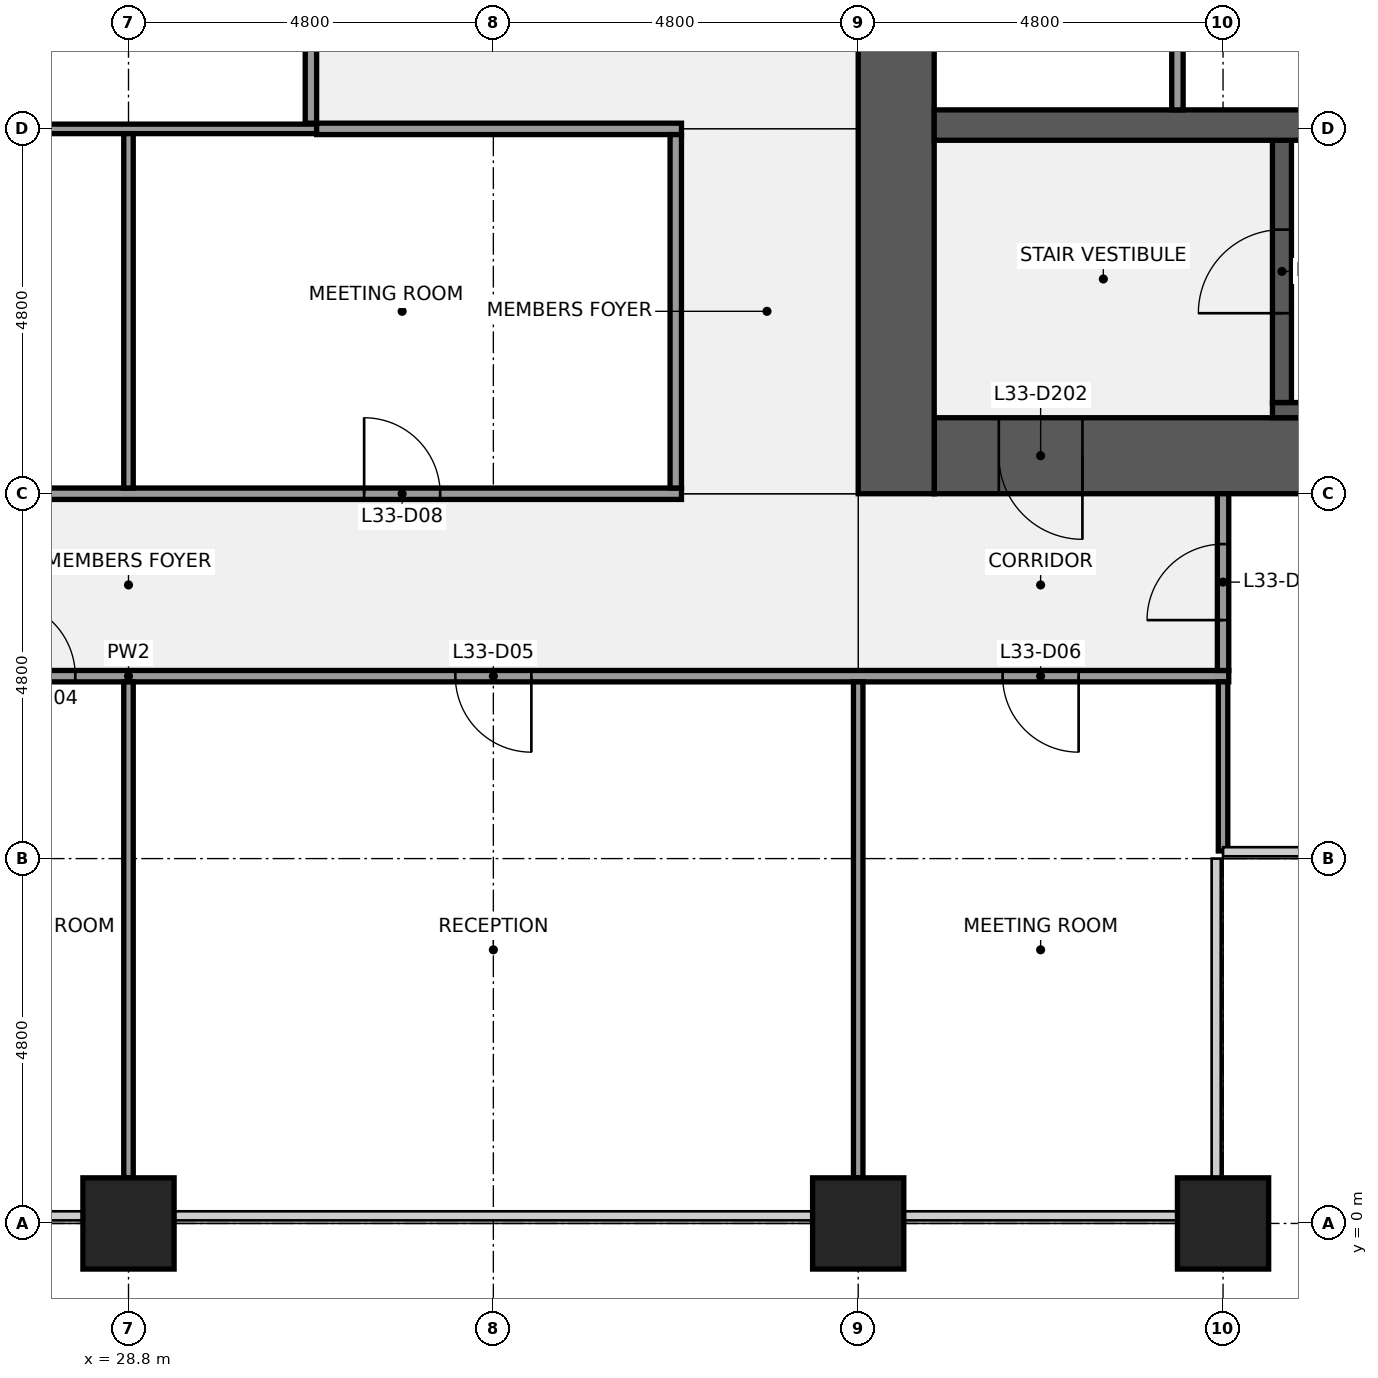
"""IFC4 building model, lengths in metres.
Left out: names, types, materials, properties, quantities, classifications, styles, units other than length and angle.
Written with IfcOpenShell. Run it as: python <this file> out.ifc"""

import sys

from ifc_helpers import new_model, si_unit, direction, frame, frame_2d, origin, origin_2d, place, context, subcontext, project, spatial, rectangle, extrude, element, fill, save


model = new_model("IFC4")
c1 = context("Model", 3, precision=1e-05, world=origin(), true_north=direction((0.0, 1.0)))
c2 = subcontext(c1, "Body", "Model", "MODEL_VIEW")
j1 = project(units=[si_unit("LENGTHUNIT", "METRE"), si_unit("PLANEANGLEUNIT", "RADIAN")], contexts=[c1])
p1 = place(None, origin())
s1 = spatial("IfcSite", under=j1, at=p1, CompositionType="ELEMENT")
p2 = place(p1, origin())
s2 = spatial("IfcBuilding", under=s1, at=p2, CompositionType="ELEMENT")
p3 = place(p2, frame((0.0, 0.0, 152.1)))
s3 = spatial("IfcBuildingStorey", under=s2, at=p3, CompositionType="ELEMENT", Elevation=152.1)
for number, where, z_axis, x_axis in (
    (1, (28.8, 0.0, 0.0), (0.0, 0.0, 1.0), (1.0, 0.0, 0.0)),
    (2, (38.4, 0.0, 0.0), (0.0, 0.0, 1.0), (1.0, 0.0, 0.0)),
    (3, (43.2, 0.0, 0.0), (0.0, 0.0, 1.0), (1.0, 0.0, 0.0)),
):
    element("IfcColumn", number, at=place(p3, frame(where, z_axis=z_axis, x_axis=x_axis)), inside=s3, PredefinedType="COLUMN", context=c2, shape_type="SweptSolid", body=[
        extrude(rectangle(XDim=1.2, YDim=1.2, at=origin_2d()), origin(), (0.0, 0.0, 1.0), 4.0),
    ])
p4 = place(p3, frame((48.0, 10.1, 0.0), z_axis=(0.0, 0.0, 1.0), x_axis=(-1.0, 0.0, 0.0)))
e4 = element("IfcWall", 4, at=p4, inside=s3, PredefinedType="SHEAR", context=c2, shape_type="SweptSolid", body=[
    extrude(rectangle(XDim=8.6, YDim=1.0, at=frame_2d((4.3, 0.0))), origin(), (0.0, 0.0, 1.0), 3.84),
])
p5 = place(p4, frame((6.65, 0.0, 0.0)))
e5 = element("IfcOpeningElement", 5, at=p5, cuts=e4, PredefinedType="OPENING", context=c2, shape_type="SweptSolid", body=[
    extrude(rectangle(XDim=1.1, YDim=2.1, at=frame_2d((0.55, 1.05))), frame((0.0, 0.51, 0.0), z_axis=(0.0, -1.0, 0.0), x_axis=(1.0, 0.0, 0.0)), (0.0, 0.0, 1.0), 1.02),
])
p6 = place(p3, frame((38.9, 9.6, 0.0), z_axis=(0.0, 0.0, 1.0), x_axis=(0.0, 1.0, 0.0)))
e6 = element("IfcWall", 6, at=p6, inside=s3, PredefinedType="SHEAR", context=c2, shape_type="SweptSolid", body=[
    extrude(rectangle(XDim=28.8, YDim=1.0, at=frame_2d((14.4, 0.0))), origin(), (0.0, 0.0, 1.0), 3.84),
])
p7 = place(p6, frame((8.7, 0.0, 0.0)))
e7 = element("IfcOpeningElement", 7, at=p7, cuts=e6, PredefinedType="OPENING", context=c2, shape_type="SweptSolid", body=[
    extrude(rectangle(XDim=1.8, YDim=2.1, at=frame_2d((0.9, 1.05))), frame((0.0, 0.51, 0.0), z_axis=(0.0, -1.0, 0.0), x_axis=(1.0, 0.0, 0.0)), (0.0, 0.0, 1.0), 1.02),
])
p8 = place(p6, frame((18.3, 0.0, 0.0)))
e8 = element("IfcOpeningElement", 8, at=p8, cuts=e6, PredefinedType="OPENING", context=c2, shape_type="SweptSolid", body=[
    extrude(rectangle(XDim=1.8, YDim=2.1, at=frame_2d((0.9, 1.05))), frame((0.0, 0.51, 0.0), z_axis=(0.0, -1.0, 0.0), x_axis=(1.0, 0.0, 0.0)), (0.0, 0.0, 1.0), 1.02),
])
p9 = place(p3, frame((43.85, 10.7, 0.0), z_axis=(0.0, 0.0, 1.0), x_axis=(1.0, 0.0, 0.0)))
e9 = element("IfcWall", 9, at=p9, inside=s3, PredefinedType="SHEAR", context=c2, shape_type="SweptSolid", body=[
    extrude(rectangle(XDim=4.15, YDim=0.2, at=frame_2d((2.075, 0.0))), origin(), (0.0, 0.0, 1.0), 3.84),
])
p10 = place(p3, frame((43.975, 10.8, 0.0), z_axis=(0.0, 0.0, 1.0), x_axis=(0.0, 1.0, 0.0)))
e10 = element("IfcWall", 10, at=p10, inside=s3, PredefinedType="SHEAR", context=c2, shape_type="SweptSolid", body=[
    extrude(rectangle(XDim=3.45, YDim=0.25, at=frame_2d((1.725, 0.0))), origin(), (0.0, 0.0, 1.0), 3.84),
])
p11 = place(p10, frame((1.175, 0.0, 0.0)))
e11 = element("IfcOpeningElement", 11, at=p11, cuts=e10, PredefinedType="OPENING", context=c2, shape_type="SweptSolid", body=[
    extrude(rectangle(XDim=1.1, YDim=2.1, at=frame_2d((0.55, 1.05))), frame((0.0, 0.135, 0.0), z_axis=(0.0, -1.0, 0.0), x_axis=(1.0, 0.0, 0.0)), (0.0, 0.0, 1.0), 0.27),
])
p12 = place(p3, frame((39.4, 14.45, 0.0), z_axis=(0.0, 0.0, 1.0), x_axis=(1.0, 0.0, 0.0)))
e12 = element("IfcWall", 12, at=p12, inside=s3, PredefinedType="SHEAR", context=c2, shape_type="SweptSolid", body=[
    extrude(rectangle(XDim=17.2, YDim=0.4, at=frame_2d((8.6, 0.0))), origin(), (0.0, 0.0, 1.0), 3.84),
])
p13 = place(p3, frame((42.6, 14.65, 0.0), z_axis=(0.0, 0.0, 1.0), x_axis=(0.0, 1.0, 0.0)))
e13 = element("IfcWall", 13, at=p13, inside=s3, PredefinedType="PARTITIONING", context=c2, shape_type="SweptSolid", body=[
    extrude(rectangle(XDim=2.6, YDim=0.15, at=frame_2d((1.3, 0.0))), origin(), (0.0, 0.0, 1.0), 3.84),
])
p14 = place(p3, frame((14.325, 7.2, 0.0), z_axis=(0.0, 0.0, 1.0), x_axis=(1.0, 0.0, 0.0)))
e14 = element("IfcWall", 14, at=p14, inside=s3, PredefinedType="PARTITIONING", context=c2, shape_type="SweptSolid", body=[
    extrude(rectangle(XDim=28.95, YDim=0.15, at=frame_2d((14.475, 0.0))), origin(), (0.0, 0.0, 1.0), 2.936),
])
p15 = place(p14, frame((1.975, 0.0, 0.0)))
e15 = element("IfcOpeningElement", 15, at=p15, cuts=e14, PredefinedType="OPENING", context=c2, shape_type="SweptSolid", body=[
    extrude(rectangle(XDim=1.0, YDim=2.1, at=frame_2d((0.5, 1.05))), frame((0.0, 0.085, 0.0), z_axis=(0.0, -1.0, 0.0), x_axis=(1.0, 0.0, 0.0)), (0.0, 0.0, 1.0), 0.17),
])
p16 = place(p14, frame((5.575, 0.0, 0.0)))
e16 = element("IfcOpeningElement", 16, at=p16, cuts=e14, PredefinedType="OPENING", context=c2, shape_type="SweptSolid", body=[
    extrude(rectangle(XDim=1.0, YDim=2.1, at=frame_2d((0.5, 1.05))), frame((0.0, 0.085, 0.0), z_axis=(0.0, -1.0, 0.0), x_axis=(1.0, 0.0, 0.0)), (0.0, 0.0, 1.0), 0.17),
])
p17 = place(p14, frame((9.175, 0.0, 0.0)))
e17 = element("IfcOpeningElement", 17, at=p17, cuts=e14, PredefinedType="OPENING", context=c2, shape_type="SweptSolid", body=[
    extrude(rectangle(XDim=1.0, YDim=2.1, at=frame_2d((0.5, 1.05))), frame((0.0, 0.085, 0.0), z_axis=(0.0, -1.0, 0.0), x_axis=(1.0, 0.0, 0.0)), (0.0, 0.0, 1.0), 0.17),
])
p18 = place(p14, frame((12.775, 0.0, 0.0)))
e18 = element("IfcOpeningElement", 18, at=p18, cuts=e14, PredefinedType="OPENING", context=c2, shape_type="SweptSolid", body=[
    extrude(rectangle(XDim=1.0, YDim=2.1, at=frame_2d((0.5, 1.05))), frame((0.0, 0.085, 0.0), z_axis=(0.0, -1.0, 0.0), x_axis=(1.0, 0.0, 0.0)), (0.0, 0.0, 1.0), 0.17),
])
p19 = place(p14, frame((18.775, 0.0, 0.0)))
e19 = element("IfcOpeningElement", 19, at=p19, cuts=e14, PredefinedType="OPENING", context=c2, shape_type="SweptSolid", body=[
    extrude(rectangle(XDim=1.0, YDim=2.1, at=frame_2d((0.5, 1.05))), frame((0.0, 0.085, 0.0), z_axis=(0.0, -1.0, 0.0), x_axis=(1.0, 0.0, 0.0)), (0.0, 0.0, 1.0), 0.17),
])
p20 = place(p14, frame((25.975, 0.0, 0.0)))
e20 = element("IfcOpeningElement", 20, at=p20, cuts=e14, PredefinedType="OPENING", context=c2, shape_type="SweptSolid", body=[
    extrude(rectangle(XDim=1.0, YDim=2.1, at=frame_2d((0.5, 1.05))), frame((0.0, 0.085, 0.0), z_axis=(0.0, -1.0, 0.0), x_axis=(1.0, 0.0, 0.0)), (0.0, 0.0, 1.0), 0.17),
])
p21 = place(p3, frame((21.525, 9.6, 0.0), z_axis=(0.0, 0.0, 1.0), x_axis=(1.0, 0.0, 0.0)))
e21 = element("IfcWall", 21, at=p21, inside=s3, PredefinedType="PARTITIONING", context=c2, shape_type="SweptSolid", body=[
    extrude(rectangle(XDim=14.55, YDim=0.15, at=frame_2d((7.275, 0.0))), origin(), (0.0, 0.0, 1.0), 2.936),
])
p22 = place(p21, frame((3.175, 0.0, 0.0)))
e22 = element("IfcOpeningElement", 22, at=p22, cuts=e21, PredefinedType="OPENING", context=c2, shape_type="SweptSolid", body=[
    extrude(rectangle(XDim=1.0, YDim=2.1, at=frame_2d((0.5, 1.05))), frame((0.0, 0.085, 0.0), z_axis=(0.0, -1.0, 0.0), x_axis=(1.0, 0.0, 0.0)), (0.0, 0.0, 1.0), 0.17),
])
p23 = place(p21, frame((10.375, 0.0, 0.0)))
e23 = element("IfcOpeningElement", 23, at=p23, cuts=e21, PredefinedType="OPENING", context=c2, shape_type="SweptSolid", body=[
    extrude(rectangle(XDim=1.0, YDim=2.1, at=frame_2d((0.5, 1.05))), frame((0.0, 0.085, 0.0), z_axis=(0.0, -1.0, 0.0), x_axis=(1.0, 0.0, 0.0)), (0.0, 0.0, 1.0), 0.17),
])
p24 = place(p3, frame((26.475, 14.4, 0.0), z_axis=(0.0, 0.0, 1.0), x_axis=(1.0, 0.0, 0.0)))
e24 = element("IfcWall", 24, at=p24, inside=s3, PredefinedType="PARTITIONING", context=c2, shape_type="SweptSolid", body=[
    extrude(rectangle(XDim=4.8, YDim=0.125, at=frame_2d((2.4, 0.0))), origin(), (0.0, 0.0, 1.0), 2.936),
])
p25 = place(p3, frame((31.275, 14.4, 0.0), z_axis=(0.0, 0.0, 1.0), x_axis=(1.0, 0.0, 0.0)))
e25 = element("IfcWall", 25, at=p25, inside=s3, PredefinedType="PARTITIONING", context=c2, shape_type="SweptSolid", body=[
    extrude(rectangle(XDim=4.8, YDim=0.15, at=frame_2d((2.4, 0.0))), origin(), (0.0, 0.0, 1.0), 2.936),
])
p26 = place(p3, frame((28.8, 0.6, 0.0), z_axis=(0.0, 0.0, 1.0), x_axis=(0.0, 1.0, 0.0)))
e26 = element("IfcWall", 26, at=p26, inside=s3, PredefinedType="PARTITIONING", context=c2, shape_type="SweptSolid", body=[
    extrude(rectangle(XDim=6.525, YDim=0.125, at=frame_2d((3.262, 0.0))), origin(), (0.0, 0.0, 1.0), 2.936),
])
p27 = place(p3, frame((28.8, 9.675, 0.0), z_axis=(0.0, 0.0, 1.0), x_axis=(0.0, 1.0, 0.0)))
e27 = element("IfcWall", 27, at=p27, inside=s3, PredefinedType="PARTITIONING", context=c2, shape_type="SweptSolid", body=[
    extrude(rectangle(XDim=4.662, YDim=0.125, at=frame_2d((2.331, 0.0))), origin(), (0.0, 0.0, 1.0), 2.936),
])
p28 = place(p3, frame((31.2, 14.475, 0.0), z_axis=(0.0, 0.0, 1.0), x_axis=(0.0, 1.0, 0.0)))
e28 = element("IfcWall", 28, at=p28, inside=s3, PredefinedType="PARTITIONING", context=c2, shape_type="SweptSolid", body=[
    extrude(rectangle(XDim=13.05, YDim=0.15, at=frame_2d((6.525, 0.0))), origin(), (0.0, 0.0, 1.0), 2.936),
])
p29 = place(p3, frame((36.0, 9.675, 0.0), z_axis=(0.0, 0.0, 1.0), x_axis=(0.0, 1.0, 0.0)))
e29 = element("IfcWall", 29, at=p29, inside=s3, PredefinedType="PARTITIONING", context=c2, shape_type="SweptSolid", body=[
    extrude(rectangle(XDim=4.65, YDim=0.15, at=frame_2d((2.325, 0.0))), origin(), (0.0, 0.0, 1.0), 2.936),
])
p30 = place(p3, frame((38.4, 0.6, 0.0), z_axis=(0.0, 0.0, 1.0), x_axis=(0.0, 1.0, 0.0)))
e30 = element("IfcWall", 30, at=p30, inside=s3, PredefinedType="PARTITIONING", context=c2, shape_type="SweptSolid", body=[
    extrude(rectangle(XDim=6.525, YDim=0.125, at=frame_2d((3.262, 0.0))), origin(), (0.0, 0.0, 1.0), 2.936),
])
p31 = place(p3, frame((43.2, 4.9, 0.0), z_axis=(0.0, 0.0, 1.0), x_axis=(0.0, 1.0, 0.0)))
e31 = element("IfcWall", 31, at=p31, inside=s3, PredefinedType="PARTITIONING", context=c2, shape_type="SweptSolid", body=[
    extrude(rectangle(XDim=2.225, YDim=0.125, at=frame_2d((1.113, 0.0))), origin(), (0.0, 0.0, 1.0), 2.936),
])
p32 = place(p3, frame((43.2, 7.275, 0.0), z_axis=(0.0, 0.0, 1.0), x_axis=(0.0, 1.0, 0.0)))
e32 = element("IfcWall", 32, at=p32, inside=s3, PredefinedType="PARTITIONING", context=c2, shape_type="SweptSolid", body=[
    extrude(rectangle(XDim=2.325, YDim=0.15, at=frame_2d((1.163, 0.0))), origin(), (0.0, 0.0, 1.0), 2.936),
])
p33 = place(p32, frame((0.663, 0.0, 0.0)))
e33 = element("IfcOpeningElement", 33, at=p33, cuts=e32, PredefinedType="OPENING", context=c2, shape_type="SweptSolid", body=[
    extrude(rectangle(XDim=1.0, YDim=2.1, at=frame_2d((0.5, 1.05))), frame((0.0, 0.085, 0.0), z_axis=(0.0, -1.0, 0.0), x_axis=(1.0, 0.0, 0.0)), (0.0, 0.0, 1.0), 0.17),
])
for number, where, z_axis, x_axis in (
    (34, (38.4, -1.05, 0.0), (0.0, 0.0, 1.0), (1.0, 0.0, 0.0)),
    (35, (43.2, -1.05, 0.0), (0.0, 0.0, 1.0), (1.0, 0.0, 0.0)),
):
    element("IfcColumn", number, at=place(p3, frame(where, z_axis=z_axis, x_axis=x_axis)), inside=s3, PredefinedType="PILASTER", context=c2, shape_type="SweptSolid", body=[
        extrude(rectangle(XDim=3.6, YDim=0.9, at=origin_2d()), origin(), (0.0, 0.0, 1.0), 4.0),
    ])
p34 = place(p11, origin())
e36 = element("IfcDoor", 36, at=p34, inside=s3, OperationType="SINGLE_SWING_LEFT", PredefinedType="DOOR", context=c2, shape_type="SweptSolid", body=[
    extrude(rectangle(XDim=1.1, YDim=2.1, at=frame_2d((0.55, 1.05))), frame((0.0, 0.025, 0.0), z_axis=(0.0, -1.0, 0.0), x_axis=(1.0, 0.0, 0.0)), (0.0, 0.0, 1.0), 0.05),
])
fill(e11, e36)
p35 = place(p5, origin())
e37 = element("IfcDoor", 37, at=p35, inside=s3, OperationType="SINGLE_SWING_LEFT", PredefinedType="DOOR", context=c2, shape_type="SweptSolid", body=[
    extrude(rectangle(XDim=1.1, YDim=2.1, at=frame_2d((0.55, 1.05))), frame((0.0, 0.025, 0.0), z_axis=(0.0, -1.0, 0.0), x_axis=(1.0, 0.0, 0.0)), (0.0, 0.0, 1.0), 0.05),
])
fill(e5, e37)
p36 = place(p18, origin())
e38 = element("IfcDoor", 38, at=p36, inside=s3, OperationType="SINGLE_SWING_LEFT", PredefinedType="DOOR", context=c2, shape_type="SweptSolid", body=[
    extrude(rectangle(XDim=1.0, YDim=2.1, at=frame_2d((0.5, 1.05))), frame((0.0, 0.025, 0.0), z_axis=(0.0, -1.0, 0.0), x_axis=(1.0, 0.0, 0.0)), (0.0, 0.0, 1.0), 0.05),
])
fill(e18, e38)
p37 = place(p19, origin())
e39 = element("IfcDoor", 39, at=p37, inside=s3, OperationType="SINGLE_SWING_RIGHT", PredefinedType="DOOR", context=c2, shape_type="SweptSolid", body=[
    extrude(rectangle(XDim=1.0, YDim=2.1, at=frame_2d((0.5, 1.05))), frame((0.0, 0.025, 0.0), z_axis=(0.0, -1.0, 0.0), x_axis=(1.0, 0.0, 0.0)), (0.0, 0.0, 1.0), 0.05),
])
fill(e19, e39)
p38 = place(p20, origin())
e40 = element("IfcDoor", 40, at=p38, inside=s3, OperationType="SINGLE_SWING_RIGHT", PredefinedType="DOOR", context=c2, shape_type="SweptSolid", body=[
    extrude(rectangle(XDim=1.0, YDim=2.1, at=frame_2d((0.5, 1.05))), frame((0.0, 0.025, 0.0), z_axis=(0.0, -1.0, 0.0), x_axis=(1.0, 0.0, 0.0)), (0.0, 0.0, 1.0), 0.05),
])
fill(e20, e40)
p39 = place(p23, origin())
e41 = element("IfcDoor", 41, at=p39, inside=s3, OperationType="SINGLE_SWING_LEFT", PredefinedType="DOOR", context=c2, shape_type="SweptSolid", body=[
    extrude(rectangle(XDim=1.0, YDim=2.1, at=frame_2d((0.5, 1.05))), frame((0.0, 0.025, 0.0), z_axis=(0.0, -1.0, 0.0), x_axis=(1.0, 0.0, 0.0)), (0.0, 0.0, 1.0), 0.05),
])
fill(e23, e41)
p40 = place(p33, origin())
e42 = element("IfcDoor", 42, at=p40, inside=s3, OperationType="SINGLE_SWING_LEFT", PredefinedType="DOOR", context=c2, shape_type="SweptSolid", body=[
    extrude(rectangle(XDim=1.0, YDim=2.1, at=frame_2d((0.5, 1.05))), frame((0.0, 0.025, 0.0), z_axis=(0.0, -1.0, 0.0), x_axis=(1.0, 0.0, 0.0)), (0.0, 0.0, 1.0), 0.05),
])
fill(e33, e42)
save(model, sys.argv[1])
